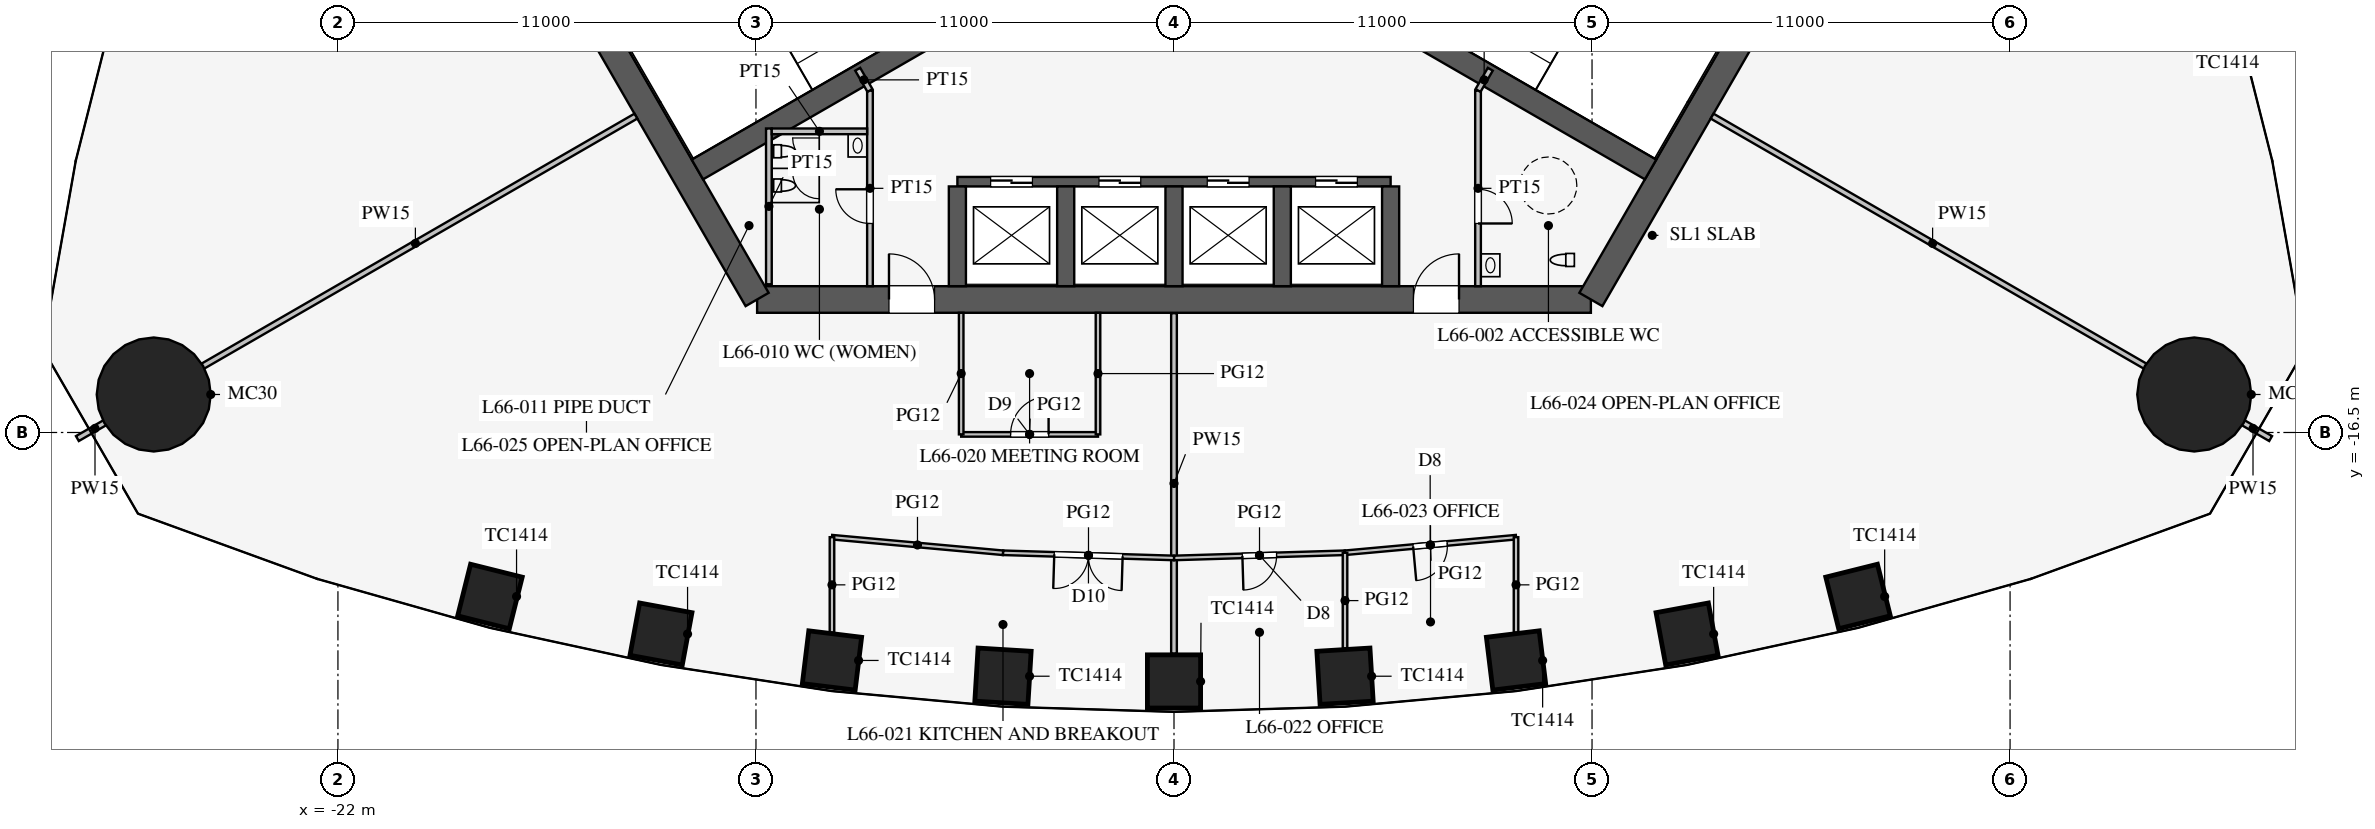
"""IFC4 building model, lengths in metres.
Left out: names, types, materials, properties, quantities, classifications, styles, units other than length and angle.
Written with IfcOpenShell. Run it as: python <this file> out.ifc"""

import sys

from ifc_helpers import new_model, si_unit, direction, frame, frame_2d, origin, origin_2d, place, context, subcontext, project, spatial, rectangle, circle, extrude, element, fill, save


model = new_model("IFC4")
c1 = context("Model", 3, precision=1e-05, world=origin(), true_north=direction((0.0, 1.0)))
c2 = subcontext(c1, "Body", "Model", "MODEL_VIEW")
j1 = project(units=[si_unit("LENGTHUNIT", "METRE"), si_unit("PLANEANGLEUNIT", "RADIAN")], contexts=[c1])
p1 = place(None, origin())
s1 = spatial("IfcSite", under=j1, at=p1, CompositionType="ELEMENT")
p2 = place(p1, origin())
s2 = spatial("IfcBuilding", under=s1, at=p2, CompositionType="ELEMENT")
p3 = place(p2, frame((0.0, 0.0, 288.9)))
s3 = spatial("IfcBuildingStorey", under=s2, at=p3, CompositionType="ELEMENT", Elevation=288.9)
for number, where, z_axis, x_axis in (
    (1, (-18.0, -20.816, 0.0), (0.0, 0.0, 1.0), (0.97, -0.242, 0.0)),
    (2, (-13.5, -21.803, 0.0), (0.0, 0.0, 1.0), (0.983, -0.182, 0.0)),
    (3, (-9.0, -22.499, 0.0), (0.0, 0.0, 1.0), (0.993, -0.121, 0.0)),
    (4, (-4.5, -22.914, 0.0), (0.0, 0.0, 1.0), (0.998, -0.061, 0.0)),
    (5, (0.0, -23.052, 0.0), (0.0, 0.0, 1.0), (1.0, 0.0, 0.0)),
    (6, (4.5, -22.914, 0.0), (0.0, 0.0, 1.0), (0.998, 0.061, 0.0)),
    (7, (9.0, -22.499, 0.0), (0.0, 0.0, 1.0), (0.993, 0.121, 0.0)),
    (8, (13.5, -21.803, 0.0), (0.0, 0.0, 1.0), (0.983, 0.182, 0.0)),
    (9, (18.0, -20.816, 0.0), (0.0, 0.0, 1.0), (0.97, 0.242, 0.0)),
):
    element("IfcColumn", number, at=place(p3, frame(where, z_axis=z_axis, x_axis=x_axis)), inside=s3, PredefinedType="COLUMN", context=c2, shape_type="SweptSolid", body=[
        extrude(rectangle(XDim=1.4, YDim=1.4, at=origin_2d()), origin(), (0.0, 0.0, 1.0), 4.2),
    ])
for number, where, z_axis, x_axis in (
    (10, (26.847, -15.5, 0.0), (0.0, 0.0, 1.0), (1.0, 0.0, 0.0)),
    (11, (-26.847, -15.5, 0.0), (0.0, 0.0, 1.0), (1.0, 0.0, 0.0)),
):
    element("IfcColumn", number, at=place(p3, frame(where, z_axis=z_axis, x_axis=x_axis)), inside=s3, PredefinedType="COLUMN", context=c2, shape_type="SweptSolid", body=[
        extrude(circle(Radius=1.5, at=origin_2d()), origin(), (0.0, 0.0, 1.0), 4.2),
    ])
p4 = place(p3, frame((-10.97, -13.0, 0.0), z_axis=(0.0, 0.0, 1.0), x_axis=(1.0, 0.0, 0.0)))
e12 = element("IfcWall", 12, at=p4, inside=s3, PredefinedType="SHEAR", context=c2, shape_type="SweptSolid", body=[
    extrude(rectangle(XDim=21.939, YDim=0.7, at=frame_2d((10.97, 0.0))), origin(), (0.0, 0.0, 1.0), 4.2),
])
p5 = place(p4, frame((17.27, 0.0, 0.0)))
e13 = element("IfcOpeningElement", 13, at=p5, cuts=e12, PredefinedType="OPENING", context=c2, shape_type="SweptSolid", body=[
    extrude(rectangle(XDim=1.2, YDim=2.1, at=frame_2d((0.6, 1.05))), frame((0.0, 0.36, 0.0), z_axis=(0.0, -1.0, 0.0), x_axis=(1.0, 0.0, 0.0)), (0.0, 0.0, 1.0), 0.72),
])
p6 = place(p4, frame((3.47, 0.0, 0.0)))
e14 = element("IfcOpeningElement", 14, at=p6, cuts=e12, PredefinedType="OPENING", context=c2, shape_type="SweptSolid", body=[
    extrude(rectangle(XDim=1.2, YDim=2.1, at=frame_2d((0.6, 1.05))), frame((0.0, 0.36, 0.0), z_axis=(0.0, -1.0, 0.0), x_axis=(1.0, 0.0, 0.0)), (0.0, 0.0, 1.0), 0.72),
])
for number, where, z_axis, x_axis in (
    (15, (10.97, -13.0, 0.0), (0.0, 0.0, 1.0), (0.5, 0.866, 0.0)),
    (16, (-16.743, -3.0, 0.0), (0.0, 0.0, 1.0), (0.5, -0.866, 0.0)),
):
    element("IfcWall", number, at=place(p3, frame(where, z_axis=z_axis, x_axis=x_axis)), inside=s3, PredefinedType="SHEAR", context=c2, shape_type="SweptSolid", body=[
        extrude(rectangle(XDim=11.547, YDim=0.7, at=frame_2d((5.773, 0.0))), origin(), (0.0, 0.0, 1.0), 4.2),
    ])
p7 = place(p3, frame((-5.7, -9.9, 0.0), z_axis=(0.0, 0.0, 1.0), x_axis=(1.0, 0.0, 0.0)))
e17 = element("IfcWall", 17, at=p7, inside=s3, PredefinedType="SHEAR", context=c2, shape_type="SweptSolid", body=[
    extrude(rectangle(XDim=11.4, YDim=0.25, at=frame_2d((5.7, 0.0))), origin(), (0.0, 0.0, 1.0), 4.2),
])
p8 = place(p7, frame((0.875, 0.0, 0.0)))
e18 = element("IfcOpeningElement", 18, at=p8, cuts=e17, PredefinedType="OPENING", context=c2, shape_type="SweptSolid", body=[
    extrude(rectangle(XDim=1.1, YDim=2.2, at=frame_2d((0.55, 1.1))), frame((0.0, 0.135, 0.0), z_axis=(0.0, -1.0, 0.0), x_axis=(1.0, 0.0, 0.0)), (0.0, 0.0, 1.0), 0.27),
])
p9 = place(p7, frame((3.725, 0.0, 0.0)))
e19 = element("IfcOpeningElement", 19, at=p9, cuts=e17, PredefinedType="OPENING", context=c2, shape_type="SweptSolid", body=[
    extrude(rectangle(XDim=1.1, YDim=2.2, at=frame_2d((0.55, 1.1))), frame((0.0, 0.135, 0.0), z_axis=(0.0, -1.0, 0.0), x_axis=(1.0, 0.0, 0.0)), (0.0, 0.0, 1.0), 0.27),
])
p10 = place(p7, frame((6.575, 0.0, 0.0)))
e20 = element("IfcOpeningElement", 20, at=p10, cuts=e17, PredefinedType="OPENING", context=c2, shape_type="SweptSolid", body=[
    extrude(rectangle(XDim=1.1, YDim=2.2, at=frame_2d((0.55, 1.1))), frame((0.0, 0.135, 0.0), z_axis=(0.0, -1.0, 0.0), x_axis=(1.0, 0.0, 0.0)), (0.0, 0.0, 1.0), 0.27),
])
p11 = place(p7, frame((9.425, 0.0, 0.0)))
e21 = element("IfcOpeningElement", 21, at=p11, cuts=e17, PredefinedType="OPENING", context=c2, shape_type="SweptSolid", body=[
    extrude(rectangle(XDim=1.1, YDim=2.2, at=frame_2d((0.55, 1.1))), frame((0.0, 0.135, 0.0), z_axis=(0.0, -1.0, 0.0), x_axis=(1.0, 0.0, 0.0)), (0.0, 0.0, 1.0), 0.27),
])
for number, where, z_axis, x_axis in (
    (22, (-5.7, -10.025, 0.0), (0.0, 0.0, 1.0), (0.0, -1.0, 0.0)),
    (23, (-2.85, -10.025, 0.0), (0.0, 0.0, 1.0), (0.0, -1.0, 0.0)),
    (24, (0.0, -10.025, 0.0), (0.0, 0.0, 1.0), (0.0, -1.0, 0.0)),
    (25, (2.85, -10.025, 0.0), (0.0, 0.0, 1.0), (0.0, -1.0, 0.0)),
    (26, (5.7, -10.025, 0.0), (0.0, 0.0, 1.0), (0.0, -1.0, 0.0)),
):
    element("IfcWall", number, at=place(p3, frame(where, z_axis=z_axis, x_axis=x_axis)), inside=s3, PredefinedType="SHEAR", context=c2, shape_type="SweptSolid", body=[
        extrude(rectangle(XDim=2.625, YDim=0.45, at=frame_2d((1.312, 0.0))), origin(), (0.0, 0.0, 1.0), 4.2),
    ])
for number, where, z_axis, x_axis in (
    (27, (4.638, -5.016, 0.0), (0.0, 0.0, 1.0), (0.866, -0.5, 0.0)),
    (28, (-4.638, -5.016, 0.0), (0.0, 0.0, 1.0), (-0.866, -0.5, 0.0)),
):
    element("IfcWall", number, at=place(p3, frame(where, z_axis=z_axis, x_axis=x_axis)), inside=s3, PredefinedType="SHEAR", context=c2, shape_type="SweptSolid", body=[
        extrude(rectangle(XDim=9.125, YDim=0.6, at=frame_2d((4.562, 0.0))), origin(), (0.0, 0.0, 1.0), 4.2),
    ])
p12 = place(p3, frame((8.0, -7.5, 0.0), z_axis=(0.0, 0.0, 1.0), x_axis=(0.0, -1.0, 0.0)))
e29 = element("IfcWall", 29, at=p12, inside=s3, PredefinedType="PARTITIONING", context=c2, shape_type="SweptSolid", body=[
    extrude(rectangle(XDim=5.15, YDim=0.15, at=frame_2d((2.575, 0.0))), origin(), (0.0, 0.0, 1.0), 4.0),
])
p13 = place(p12, frame((2.6, 0.0, 0.0)))
e30 = element("IfcOpeningElement", 30, at=p13, cuts=e29, PredefinedType="OPENING", context=c2, shape_type="SweptSolid", body=[
    extrude(rectangle(XDim=0.9, YDim=2.1, at=frame_2d((0.45, 1.05))), frame((0.0, 0.085, 0.0), z_axis=(0.0, -1.0, 0.0), x_axis=(1.0, 0.0, 0.0)), (0.0, 0.0, 1.0), 0.17),
])
p14 = place(p3, frame((-8.0, -7.5, 0.0), z_axis=(0.0, 0.0, 1.0), x_axis=(0.0, -1.0, 0.0)))
e31 = element("IfcWall", 31, at=p14, inside=s3, PredefinedType="PARTITIONING", context=c2, shape_type="SweptSolid", body=[
    extrude(rectangle(XDim=5.15, YDim=0.15, at=frame_2d((2.575, 0.0))), origin(), (0.0, 0.0, 1.0), 4.0),
])
p15 = place(p14, frame((2.6, 0.0, 0.0)))
e32 = element("IfcOpeningElement", 32, at=p15, cuts=e31, PredefinedType="OPENING", context=c2, shape_type="SweptSolid", body=[
    extrude(rectangle(XDim=0.9, YDim=2.1, at=frame_2d((0.45, 1.05))), frame((0.0, 0.085, 0.0), z_axis=(0.0, -1.0, 0.0), x_axis=(1.0, 0.0, 0.0)), (0.0, 0.0, 1.0), 0.17),
])
for number, where, z_axis, x_axis in (
    (33, (8.0, -7.5, 0.0), (0.0, 0.0, 1.0), (0.5, 0.866, 0.0)),
    (34, (-8.0, -7.5, 0.0), (0.0, 0.0, 1.0), (-0.5, 0.866, 0.0)),
):
    element("IfcWall", number, at=place(p3, frame(where, z_axis=z_axis, x_axis=x_axis)), inside=s3, PredefinedType="PARTITIONING", context=c2, shape_type="SweptSolid", body=[
        extrude(rectangle(XDim=0.645, YDim=0.15, at=frame_2d((0.323, 0.0))), origin(), (0.0, 0.0, 1.0), 4.0),
    ])
p16 = place(p3, frame((-10.66, -8.5, 0.0), z_axis=(0.0, 0.0, 1.0), x_axis=(0.0, -1.0, 0.0)))
e35 = element("IfcWall", 35, at=p16, inside=s3, PredefinedType="PARTITIONING", context=c2, shape_type="SweptSolid", body=[
    extrude(rectangle(XDim=4.1, YDim=0.15, at=frame_2d((2.05, 0.0))), origin(), (0.0, 0.0, 1.0), 4.0),
])
p17 = place(p3, frame((-8.075, -8.575, 0.0), z_axis=(0.0, 0.0, 1.0), x_axis=(-1.0, 0.0, 0.0)))
e36 = element("IfcWall", 36, at=p17, inside=s3, PredefinedType="PARTITIONING", context=c2, shape_type="SweptSolid", body=[
    extrude(rectangle(XDim=2.51, YDim=0.15, at=frame_2d((1.255, 0.0))), origin(), (0.0, 0.0, 1.0), 4.0),
])
p18 = place(p3, frame((14.159, -8.175, 0.0), z_axis=(0.0, 0.0, 1.0), x_axis=(0.866026905467, -0.499997399001, 0.0)))
e37 = element("IfcWall", 37, at=p18, inside=s3, PredefinedType="PARTITIONING", context=c2, shape_type="SweptSolid", body=[
    extrude(rectangle(XDim=13.4, YDim=0.15, at=frame_2d((6.7, 0.0))), origin(), (0.0, 0.0, 1.0), 2.5),
])
p19 = place(p3, frame((27.929, -16.125, 0.0), z_axis=(0.0, 0.0, 1.0), x_axis=(0.866086810508, -0.499893625349, 0.0)))
e38 = element("IfcWall", 38, at=p19, inside=s3, PredefinedType="PARTITIONING", context=c2, shape_type="SweptSolid", body=[
    extrude(rectangle(XDim=1.07, YDim=0.15, at=frame_2d((0.535, 0.0))), origin(), (0.0, 0.0, 1.0), 2.5),
])
p20 = place(p3, frame((-14.159, -8.175, 0.0), z_axis=(0.0, 0.0, 1.0), x_axis=(-0.866026905467, -0.499997399001, 0.0)))
e39 = element("IfcWall", 39, at=p20, inside=s3, PredefinedType="PARTITIONING", context=c2, shape_type="SweptSolid", body=[
    extrude(rectangle(XDim=13.4, YDim=0.15, at=frame_2d((6.7, 0.0))), origin(), (0.0, 0.0, 1.0), 2.5),
])
p21 = place(p3, frame((-27.929, -16.125, 0.0), z_axis=(0.0, 0.0, 1.0), x_axis=(-0.866086810508, -0.499893625349, 0.0)))
e40 = element("IfcWall", 40, at=p21, inside=s3, PredefinedType="PARTITIONING", context=c2, shape_type="SweptSolid", body=[
    extrude(rectangle(XDim=1.07, YDim=0.15, at=frame_2d((0.535, 0.0))), origin(), (0.0, 0.0, 1.0), 2.5),
])
p22 = place(p3, frame((0.0, -13.36, 0.0), z_axis=(0.0, 0.0, 1.0), x_axis=(0.0, -1.0, 0.0)))
e41 = element("IfcWall", 41, at=p22, inside=s3, PredefinedType="PARTITIONING", context=c2, shape_type="SweptSolid", body=[
    extrude(rectangle(XDim=8.961, YDim=0.15, at=frame_2d((4.481, 0.0))), origin(), (0.0, 0.0, 1.0), 3.3),
])
p23 = place(p3, frame((-5.6, -16.55, 0.0), z_axis=(0.0, 0.0, 1.0), x_axis=(1.0, 0.0, 0.0)))
e42 = element("IfcWall", 42, at=p23, inside=s3, PredefinedType="PARTITIONING", context=c2, shape_type="SweptSolid", body=[
    extrude(rectangle(XDim=3.6, YDim=0.12, at=frame_2d((1.8, 0.0))), origin(), (0.0, 0.0, 1.0), 2.9),
])
p24 = place(p23, frame((1.3, 0.0, 0.15)))
e43 = element("IfcOpeningElement", 43, at=p24, cuts=e42, PredefinedType="OPENING", context=c2, shape_type="SweptSolid", body=[
    extrude(rectangle(XDim=1.0, YDim=2.1, at=frame_2d((0.5, 1.05))), frame((0.0, 0.07, 0.0), z_axis=(0.0, -1.0, 0.0), x_axis=(1.0, 0.0, 0.0)), (0.0, 0.0, 1.0), 0.14),
])
for number, where, z_axis, x_axis in (
    (44, (-2.0, -13.35, 0.0), (0.0, 0.0, 1.0), (0.0, -1.0, 0.0)),
    (45, (-5.6, -13.35, 0.0), (0.0, 0.0, 1.0), (0.0, -1.0, 0.0)),
):
    element("IfcWall", number, at=place(p3, frame(where, z_axis=z_axis, x_axis=x_axis)), inside=s3, PredefinedType="PARTITIONING", context=c2, shape_type="SweptSolid", body=[
        extrude(rectangle(XDim=3.2, YDim=0.12, at=frame_2d((1.6, 0.0))), origin(), (0.0, 0.0, 1.0), 2.9),
    ])
p25 = place(p3, frame((0.0, -19.802, 0.0), z_axis=(0.0, 0.0, 1.0), x_axis=(0.999542074227, 0.030259574513, 0.0)))
e46 = element("IfcWall", 46, at=p25, inside=s3, PredefinedType="PARTITIONING", context=c2, shape_type="SweptSolid", body=[
    extrude(rectangle(XDim=4.502, YDim=0.12, at=frame_2d((2.251, 0.0))), origin(), (0.0, 0.0, 1.0), 2.9),
])
p26 = place(p25, frame((1.8, 0.0, 0.15)))
e47 = element("IfcOpeningElement", 47, at=p26, cuts=e46, PredefinedType="OPENING", context=c2, shape_type="SweptSolid", body=[
    extrude(rectangle(XDim=0.9, YDim=2.1, at=frame_2d((0.45, 1.05))), frame((0.0, 0.07, 0.0), z_axis=(0.0, -1.0, 0.0), x_axis=(1.0, 0.0, 0.0)), (0.0, 0.0, 1.0), 0.14),
])
p27 = place(p3, frame((4.5, -19.665, 0.0), z_axis=(0.0, 0.0, 1.0), x_axis=(0.995871921504, 0.090769576179, 0.0)))
e48 = element("IfcWall", 48, at=p27, inside=s3, PredefinedType="PARTITIONING", context=c2, shape_type="SweptSolid", body=[
    extrude(rectangle(XDim=4.519, YDim=0.12, at=frame_2d((2.259, 0.0))), origin(), (0.0, 0.0, 1.0), 2.9),
])
p28 = place(p27, frame((1.8, 0.0, 0.15)))
e49 = element("IfcOpeningElement", 49, at=p28, cuts=e48, PredefinedType="OPENING", context=c2, shape_type="SweptSolid", body=[
    extrude(rectangle(XDim=0.9, YDim=2.1, at=frame_2d((0.45, 1.05))), frame((0.0, 0.07, 0.0), z_axis=(0.0, -1.0, 0.0), x_axis=(1.0, 0.0, 0.0)), (0.0, 0.0, 1.0), 0.14),
])
p29 = place(p3, frame((-4.5, -19.665, 0.0), z_axis=(0.0, 0.0, 1.0), x_axis=(0.999542074227, -0.030259574513, 0.0)))
e50 = element("IfcWall", 50, at=p29, inside=s3, PredefinedType="PARTITIONING", context=c2, shape_type="SweptSolid", body=[
    extrude(rectangle(XDim=4.502, YDim=0.12, at=frame_2d((2.251, 0.0))), origin(), (0.0, 0.0, 1.0), 2.9),
])
p30 = place(p29, frame((1.35, 0.0, 0.15)))
e51 = element("IfcOpeningElement", 51, at=p30, cuts=e50, PredefinedType="OPENING", context=c2, shape_type="SweptSolid", body=[
    extrude(rectangle(XDim=1.8, YDim=2.1, at=frame_2d((0.9, 1.05))), frame((0.0, 0.07, 0.0), z_axis=(0.0, -1.0, 0.0), x_axis=(1.0, 0.0, 0.0)), (0.0, 0.0, 1.0), 0.14),
])
p31 = place(p3, frame((-9.0, -19.255, 0.0), z_axis=(0.0, 0.0, 1.0), x_axis=(0.995871921504, -0.090769576179, 0.0)))
e52 = element("IfcWall", 52, at=p31, inside=s3, PredefinedType="PARTITIONING", context=c2, shape_type="SweptSolid", body=[
    extrude(rectangle(XDim=4.519, YDim=0.12, at=frame_2d((2.259, 0.0))), origin(), (0.0, 0.0, 1.0), 2.9),
])
p32 = place(p3, frame((4.5, -19.665, 0.0), z_axis=(0.0, 0.0, 1.0), x_axis=(0.0, -1.0, 0.0)))
e53 = element("IfcWall", 53, at=p32, inside=s3, PredefinedType="PARTITIONING", context=c2, shape_type="SweptSolid", body=[
    extrude(rectangle(XDim=2.517, YDim=0.12, at=frame_2d((1.259, 0.0))), origin(), (0.0, 0.0, 1.0), 2.9),
])
for number, where, z_axis, x_axis in (
    (54, (9.0, -19.255, 0.0), (0.0, 0.0, 1.0), (0.0, -1.0, 0.0)),
    (55, (-9.0, -19.255, 0.0), (0.0, 0.0, 1.0), (0.0, -1.0, 0.0)),
):
    element("IfcWall", number, at=place(p3, frame(where, z_axis=z_axis, x_axis=x_axis)), inside=s3, PredefinedType="PARTITIONING", context=c2, shape_type="SweptSolid", body=[
        extrude(rectangle(XDim=2.509, YDim=0.12, at=frame_2d((1.254, 0.0))), origin(), (0.0, 0.0, 1.0), 2.9),
    ])
p33 = place(p13, origin())
e56 = element("IfcDoor", 56, at=p33, inside=s3, OperationType="SINGLE_SWING_RIGHT", PredefinedType="DOOR", context=c2, shape_type="SweptSolid", body=[
    extrude(rectangle(XDim=0.9, YDim=2.1, at=frame_2d((0.45, 1.05))), frame((0.0, 0.025, 0.0), z_axis=(0.0, -1.0, 0.0), x_axis=(1.0, 0.0, 0.0)), (0.0, 0.0, 1.0), 0.05),
])
fill(e30, e56)
p34 = place(p15, frame((0.9, 0.0, 0.0), z_axis=(0.0, 0.0, 1.0), x_axis=(-1.0, 0.0, 0.0)))
e57 = element("IfcDoor", 57, at=p34, inside=s3, OperationType="SINGLE_SWING_RIGHT", PredefinedType="DOOR", context=c2, shape_type="SweptSolid", body=[
    extrude(rectangle(XDim=0.9, YDim=2.1, at=frame_2d((0.45, 1.05))), frame((0.0, 0.025, 0.0), z_axis=(0.0, -1.0, 0.0), x_axis=(1.0, 0.0, 0.0)), (0.0, 0.0, 1.0), 0.05),
])
fill(e32, e57)
p35 = place(p5, origin())
e58 = element("IfcDoor", 58, at=p35, inside=s3, OperationType="SINGLE_SWING_RIGHT", PredefinedType="DOOR", context=c2, shape_type="SweptSolid", body=[
    extrude(rectangle(XDim=1.2, YDim=2.1, at=frame_2d((0.6, 1.05))), frame((0.0, 0.025, 0.0), z_axis=(0.0, -1.0, 0.0), x_axis=(1.0, 0.0, 0.0)), (0.0, 0.0, 1.0), 0.05),
])
fill(e13, e58)
p36 = place(p6, origin())
e59 = element("IfcDoor", 59, at=p36, inside=s3, OperationType="SINGLE_SWING_LEFT", PredefinedType="DOOR", context=c2, shape_type="SweptSolid", body=[
    extrude(rectangle(XDim=1.2, YDim=2.1, at=frame_2d((0.6, 1.05))), frame((0.0, 0.025, 0.0), z_axis=(0.0, -1.0, 0.0), x_axis=(1.0, 0.0, 0.0)), (0.0, 0.0, 1.0), 0.05),
])
fill(e14, e59)
p37 = place(p24, origin())
e60 = element("IfcDoor", 60, at=p37, inside=s3, OperationType="SINGLE_SWING_RIGHT", PredefinedType="DOOR", context=c2, shape_type="SweptSolid", body=[
    extrude(rectangle(XDim=1.0, YDim=2.1, at=frame_2d((0.5, 1.05))), frame((0.0, 0.025, 0.0), z_axis=(0.0, -1.0, 0.0), x_axis=(1.0, 0.0, 0.0)), (0.0, 0.0, 1.0), 0.05),
])
fill(e43, e60)
p38 = place(p30, frame((1.8, 0.0, 0.0), z_axis=(0.0, 0.0, 1.0), x_axis=(-1.0, 0.0, 0.0)))
e61 = element("IfcDoor", 61, at=p38, inside=s3, OperationType="DOUBLE_DOOR_SINGLE_SWING", PredefinedType="DOOR", context=c2, shape_type="SweptSolid", body=[
    extrude(rectangle(XDim=1.8, YDim=2.1, at=frame_2d((0.9, 1.05))), frame((0.0, 0.025, 0.0), z_axis=(0.0, -1.0, 0.0), x_axis=(1.0, 0.0, 0.0)), (0.0, 0.0, 1.0), 0.05),
])
fill(e51, e61)
p39 = place(p26, frame((0.9, 0.0, 0.0), z_axis=(0.0, 0.0, 1.0), x_axis=(-1.0, 0.0, 0.0)))
e62 = element("IfcDoor", 62, at=p39, inside=s3, OperationType="SINGLE_SWING_RIGHT", PredefinedType="DOOR", context=c2, shape_type="SweptSolid", body=[
    extrude(rectangle(XDim=0.9, YDim=2.1, at=frame_2d((0.45, 1.05))), frame((0.0, 0.025, 0.0), z_axis=(0.0, -1.0, 0.0), x_axis=(1.0, 0.0, 0.0)), (0.0, 0.0, 1.0), 0.05),
])
fill(e47, e62)
p40 = place(p28, frame((0.9, 0.0, 0.0), z_axis=(0.0, 0.0, 1.0), x_axis=(-1.0, 0.0, 0.0)))
e63 = element("IfcDoor", 63, at=p40, inside=s3, OperationType="SINGLE_SWING_RIGHT", PredefinedType="DOOR", context=c2, shape_type="SweptSolid", body=[
    extrude(rectangle(XDim=0.9, YDim=2.1, at=frame_2d((0.45, 1.05))), frame((0.0, 0.025, 0.0), z_axis=(0.0, -1.0, 0.0), x_axis=(1.0, 0.0, 0.0)), (0.0, 0.0, 1.0), 0.05),
])
fill(e49, e63)
p41 = place(p8, origin())
e64 = element("IfcDoor", 64, at=p41, inside=s3, OperationType="DOUBLE_DOOR_SLIDING", PredefinedType="DOOR", context=c2, shape_type="SweptSolid", body=[
    extrude(rectangle(XDim=1.1, YDim=2.2, at=frame_2d((0.55, 1.1))), frame((0.0, 0.025, 0.0), z_axis=(0.0, -1.0, 0.0), x_axis=(1.0, 0.0, 0.0)), (0.0, 0.0, 1.0), 0.05),
])
fill(e18, e64)
p42 = place(p9, origin())
e65 = element("IfcDoor", 65, at=p42, inside=s3, OperationType="DOUBLE_DOOR_SLIDING", PredefinedType="DOOR", context=c2, shape_type="SweptSolid", body=[
    extrude(rectangle(XDim=1.1, YDim=2.2, at=frame_2d((0.55, 1.1))), frame((0.0, 0.025, 0.0), z_axis=(0.0, -1.0, 0.0), x_axis=(1.0, 0.0, 0.0)), (0.0, 0.0, 1.0), 0.05),
])
fill(e19, e65)
p43 = place(p10, origin())
e66 = element("IfcDoor", 66, at=p43, inside=s3, OperationType="DOUBLE_DOOR_SLIDING", PredefinedType="DOOR", context=c2, shape_type="SweptSolid", body=[
    extrude(rectangle(XDim=1.1, YDim=2.2, at=frame_2d((0.55, 1.1))), frame((0.0, 0.025, 0.0), z_axis=(0.0, -1.0, 0.0), x_axis=(1.0, 0.0, 0.0)), (0.0, 0.0, 1.0), 0.05),
])
fill(e20, e66)
p44 = place(p11, origin())
e67 = element("IfcDoor", 67, at=p44, inside=s3, OperationType="DOUBLE_DOOR_SLIDING", PredefinedType="DOOR", context=c2, shape_type="SweptSolid", body=[
    extrude(rectangle(XDim=1.1, YDim=2.2, at=frame_2d((0.55, 1.1))), frame((0.0, 0.025, 0.0), z_axis=(0.0, -1.0, 0.0), x_axis=(1.0, 0.0, 0.0)), (0.0, 0.0, 1.0), 0.05),
])
fill(e21, e67)
save(model, sys.argv[1])
